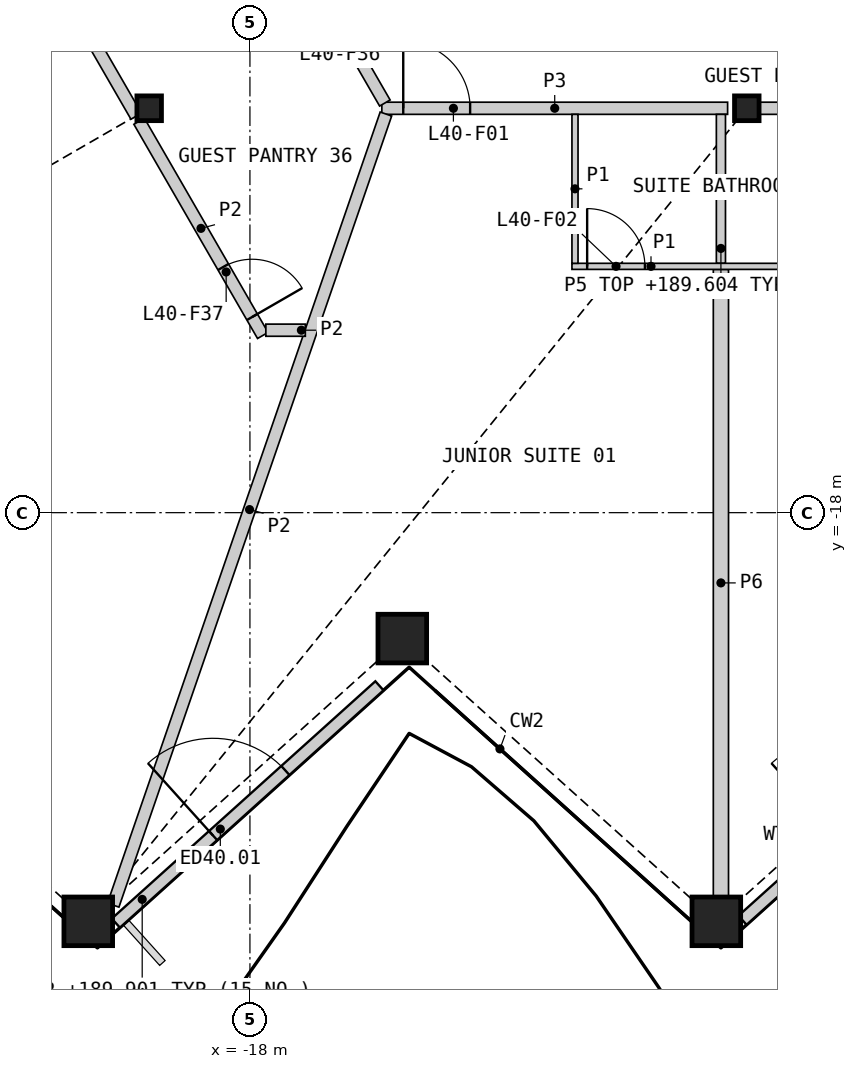
"""IFC4 building model, lengths in metres.
Left out: names, types, materials, properties, quantities, classifications, styles, units other than length and angle.
Written with IfcOpenShell. Run it as: python <this file> out.ifc"""

import sys

from ifc_helpers import new_model, si_unit, direction, frame, frame_2d, origin, origin_2d, place, context, subcontext, project, spatial, rectangle, hollow_rectangle, i_section, extrude, element, fill, save


model = new_model("IFC4")
c1 = context("Model", 3, precision=1e-05, world=origin(), true_north=direction((0.0, 1.0)))
c2 = subcontext(c1, "Body", "Model", "MODEL_VIEW")
j1 = project(units=[si_unit("LENGTHUNIT", "METRE"), si_unit("PLANEANGLEUNIT", "RADIAN")], contexts=[c1])
p1 = place(None, origin())
s1 = spatial("IfcSite", under=j1, at=p1, CompositionType="ELEMENT")
p2 = place(p1, origin())
s2 = spatial("IfcBuilding", under=s1, at=p2, CompositionType="ELEMENT")
p3 = place(p2, frame((0.0, 0.0, 187.2)))
s3 = spatial("IfcBuildingStorey", under=s2, at=p3, CompositionType="ELEMENT", Elevation=187.2)
for number, where, z_axis, x_axis in (
    (1, (-20.659, -24.722, 0.0), (0.0, 0.0, 1.0), (1.0, 0.0, 0.0)),
    (2, (-15.494, -20.071, 0.0), (0.0, 0.0, 1.0), (1.0, 0.0, 0.0)),
    (3, (-10.329, -24.722, 0.0), (0.0, 0.0, 1.0), (1.0, 0.0, 0.0)),
):
    element("IfcColumn", number, at=place(p3, frame(where, z_axis=z_axis, x_axis=x_axis)), inside=s3, PredefinedType="COLUMN", context=c2, shape_type="SweptSolid", body=[
        extrude(hollow_rectangle(XDim=0.8, YDim=0.8, WallThickness=0.05, at=origin_2d()), origin(), (0.0, 0.0, 1.0), 3.6),
    ])
for number, where, z_axis, x_axis in (
    (4, (-19.657, -11.349, 0.0), (0.0, 0.0, 1.0), (1.0, 0.0, 0.0)),
    (5, (-9.828, -11.349, 0.0), (0.0, 0.0, 1.0), (1.0, 0.0, 0.0)),
):
    element("IfcColumn", number, at=place(p3, frame(where, z_axis=z_axis, x_axis=x_axis)), inside=s3, PredefinedType="COLUMN", context=c2, shape_type="SweptSolid", body=[
        extrude(i_section(OverallWidth=0.404, OverallDepth=0.407, WebThickness=0.027, FlangeThickness=0.044, at=origin_2d()), origin(), (0.0, 0.0, 1.0), 3.6),
    ])
p4 = place(p3, frame((-20.205, -24.751, 0.0), z_axis=(0.0, 0.0, 1.0), x_axis=(0.743135964011, 0.669140447883, 0.0)))
e6 = element("IfcWall", 6, at=p4, inside=s3, PredefinedType="SOLIDWALL", context=c2, shape_type="SweptSolid", body=[
    extrude(rectangle(XDim=5.833, YDim=0.2, at=frame_2d((2.917, 0.0))), origin(), (0.0, 0.0, 1.0), 2.701),
])
p5 = place(p4, frame((2.152, 0.0, 0.0)))
e7 = element("IfcOpeningElement", 7, at=p5, cuts=e6, PredefinedType="OPENING", context=c2, shape_type="SweptSolid", body=[
    extrude(rectangle(XDim=1.6, YDim=2.4, at=frame_2d((0.8, 1.2))), frame((0.0, 0.11, 0.0), z_axis=(0.0, -1.0, 0.0), x_axis=(1.0, 0.0, 0.0)), (0.0, 0.0, 1.0), 0.22),
])
p6 = place(p3, frame((-9.899, -24.704, 0.0), z_axis=(0.0, 0.0, 1.0), x_axis=(0.74312139518, 0.669156627424, 0.0)))
e8 = element("IfcWall", 8, at=p6, inside=s3, PredefinedType="SOLIDWALL", context=c2, shape_type="SweptSolid", body=[
    extrude(rectangle(XDim=5.763, YDim=0.2, at=frame_2d((2.882, 0.0))), origin(), (0.0, 0.0, 1.0), 2.701),
])
p7 = place(p6, frame((2.082, 0.0, 0.0)))
e9 = element("IfcOpeningElement", 9, at=p7, cuts=e8, PredefinedType="OPENING", context=c2, shape_type="SweptSolid", body=[
    extrude(rectangle(XDim=1.6, YDim=2.4, at=frame_2d((0.8, 1.2))), frame((0.0, 0.11, 0.0), z_axis=(0.0, -1.0, 0.0), x_axis=(1.0, 0.0, 0.0)), (0.0, 0.0, 1.0), 0.22),
])
p8 = place(p3, frame((-10.254, -24.312, 0.0), z_axis=(0.0, 0.0, 1.0), x_axis=(0.0, 1.0, 0.0)))
e10 = element("IfcWall", 10, at=p8, inside=s3, PredefinedType="PARTITIONING", context=c2, shape_type="SweptSolid", body=[
    extrude(rectangle(XDim=10.313, YDim=0.25, at=frame_2d((5.156, 0.0))), origin(), (0.0, 0.0, 1.0), 2.404),
])
p9 = place(p3, frame((-9.615, -11.349, 0.0), z_axis=(0.0, 0.0, 1.0), x_axis=(1.0, 0.0, 0.0)))
e11 = element("IfcWall", 11, at=p9, inside=s3, PredefinedType="PARTITIONING", context=c2, shape_type="SweptSolid", body=[
    extrude(rectangle(XDim=9.401, YDim=0.2, at=frame_2d((4.701, 0.0))), origin(), (0.0, 0.0, 1.0), 3.25),
])
p10 = place(p9, frame((3.15, 0.0, 0.0)))
e12 = element("IfcOpeningElement", 12, at=p10, cuts=e11, PredefinedType="OPENING", context=c2, shape_type="SweptSolid", body=[
    extrude(rectangle(XDim=1.0, YDim=2.1, at=frame_2d((0.5, 1.05))), frame((0.0, 0.11, 0.0), z_axis=(0.0, -1.0, 0.0), x_axis=(1.0, 0.0, 0.0)), (0.0, 0.0, 1.0), 0.22),
])
p11 = place(p9, frame((4.851, 0.0, 0.0)))
e13 = element("IfcOpeningElement", 13, at=p11, cuts=e11, PredefinedType="OPENING", context=c2, shape_type="SweptSolid", body=[
    extrude(rectangle(XDim=1.0, YDim=2.1, at=frame_2d((0.5, 1.05))), frame((0.0, 0.11, 0.0), z_axis=(0.0, -1.0, 0.0), x_axis=(1.0, 0.0, 0.0)), (0.0, 0.0, 1.0), 0.22),
])
p12 = place(p3, frame((-15.831, -11.349, 0.0), z_axis=(0.0, 0.0, 1.0), x_axis=(1.0, 0.0, 0.0)))
e14 = element("IfcWall", 14, at=p12, inside=s3, PredefinedType="PARTITIONING", context=c2, shape_type="SweptSolid", body=[
    extrude(rectangle(XDim=5.687, YDim=0.2, at=frame_2d((2.843, 0.0))), origin(), (0.0, 0.0, 1.0), 3.25),
])
p13 = place(p12, frame((0.352, 0.0, 0.0)))
e15 = element("IfcOpeningElement", 15, at=p13, cuts=e14, PredefinedType="OPENING", context=c2, shape_type="SweptSolid", body=[
    extrude(rectangle(XDim=1.1, YDim=2.1, at=frame_2d((0.55, 1.05))), frame((0.0, 0.11, 0.0), z_axis=(0.0, -1.0, 0.0), x_axis=(1.0, 0.0, 0.0)), (0.0, 0.0, 1.0), 0.22),
])
p14 = place(p3, frame((-17.644, -8.035, 0.0), z_axis=(0.0, 0.0, 1.0), x_axis=(0.499958791762, -0.866049194065, 0.0)))
e16 = element("IfcWall", 16, at=p14, inside=s3, PredefinedType="PARTITIONING", context=c2, shape_type="SweptSolid", body=[
    extrude(rectangle(XDim=3.726, YDim=0.2, at=frame_2d((1.863, 0.0))), origin(), (0.0, 0.0, 1.0), 3.25),
])
p15 = place(p14, frame((1.388, 0.0, 0.0)))
e17 = element("IfcOpeningElement", 17, at=p15, cuts=e16, PredefinedType="OPENING", context=c2, shape_type="SweptSolid", body=[
    extrude(rectangle(XDim=0.95, YDim=2.1, at=frame_2d((0.475, 1.05))), frame((0.0, 0.11, 0.0), z_axis=(0.0, -1.0, 0.0), x_axis=(1.0, 0.0, 0.0)), (0.0, 0.0, 1.0), 0.22),
])
p16 = place(p3, frame((-20.249, -24.455, 0.0), z_axis=(0.0, 0.0, 1.0), x_axis=(0.325902118519, 0.945403516571, 0.0)))
e18 = element("IfcWall", 18, at=p16, inside=s3, PredefinedType="PARTITIONING", context=c2, shape_type="SweptSolid", body=[
    extrude(rectangle(XDim=13.763, YDim=0.2, at=frame_2d((6.881, 0.0))), origin(), (0.0, 0.0, 1.0), 2.404),
])
p17 = place(p3, frame((-21.958, -7.862, 0.0), z_axis=(0.0, 0.0, 1.0), x_axis=(0.499987304225, -0.866032733569, 0.0)))
e19 = element("IfcWall", 19, at=p17, inside=s3, PredefinedType="PARTITIONING", context=c2, shape_type="SweptSolid", body=[
    extrude(rectangle(XDim=4.176, YDim=0.2, at=frame_2d((2.088, 0.0))), origin(), (0.0, 0.0, 1.0), 2.404),
])
p18 = place(p3, frame((-19.822, -11.562, 0.0), z_axis=(0.0, 0.0, 1.0), x_axis=(0.499992600721, -0.866029675718, 0.0)))
e20 = element("IfcWall", 20, at=p18, inside=s3, PredefinedType="PARTITIONING", context=c2, shape_type="SweptSolid", body=[
    extrude(rectangle(XDim=4.068, YDim=0.2, at=frame_2d((2.034, 0.0))), origin(), (0.0, 0.0, 1.0), 2.404),
])
p19 = place(p18, frame((2.767, 0.0, 0.0)))
e21 = element("IfcOpeningElement", 21, at=p19, cuts=e20, PredefinedType="OPENING", context=c2, shape_type="SweptSolid", body=[
    extrude(rectangle(XDim=0.95, YDim=2.1, at=frame_2d((0.475, 1.05))), frame((0.0, 0.11, 0.0), z_axis=(0.0, -1.0, 0.0), x_axis=(1.0, 0.0, 0.0)), (0.0, 0.0, 1.0), 0.22),
])
p20 = place(p3, frame((-17.738, -14.999, 0.0), z_axis=(0.0, 0.0, 1.0), x_axis=(1.0, 0.0, 0.0)))
e22 = element("IfcWall", 22, at=p20, inside=s3, PredefinedType="PARTITIONING", context=c2, shape_type="SweptSolid", body=[
    extrude(rectangle(XDim=0.649, YDim=0.2, at=frame_2d((0.325, 0.0))), origin(), (0.0, 0.0, 1.0), 2.404),
])
p21 = place(p3, frame((-10.254, -13.899, 0.0), z_axis=(0.0, 0.0, 1.0), x_axis=(0.0, 1.0, 0.0)))
e23 = element("IfcWall", 23, at=p21, inside=s3, PredefinedType="PLUMBINGWALL", context=c2, shape_type="SweptSolid", body=[
    extrude(rectangle(XDim=2.45, YDim=0.15, at=frame_2d((1.225, 0.0))), origin(), (0.0, 0.0, 1.0), 2.404),
])
p22 = place(p3, frame((-12.704, -13.949, 0.0), z_axis=(0.0, 0.0, 1.0), x_axis=(1.0, 0.0, 0.0)))
e24 = element("IfcWall", 24, at=p22, inside=s3, PredefinedType="PARTITIONING", context=c2, shape_type="SweptSolid", body=[
    extrude(rectangle(XDim=5.2, YDim=0.1, at=frame_2d((2.6, 0.0))), origin(), (0.0, 0.0, 1.0), 2.404),
])
p23 = place(p22, frame((0.25, 0.0, 0.0)))
e25 = element("IfcOpeningElement", 25, at=p23, cuts=e24, PredefinedType="OPENING", context=c2, shape_type="SweptSolid", body=[
    extrude(rectangle(XDim=0.95, YDim=2.1, at=frame_2d((0.475, 1.05))), frame((0.0, 0.06, 0.0), z_axis=(0.0, -1.0, 0.0), x_axis=(1.0, 0.0, 0.0)), (0.0, 0.0, 1.0), 0.12),
])
p24 = place(p22, frame((4.0, 0.0, 0.0)))
e26 = element("IfcOpeningElement", 26, at=p24, cuts=e24, PredefinedType="OPENING", context=c2, shape_type="SweptSolid", body=[
    extrude(rectangle(XDim=0.95, YDim=2.1, at=frame_2d((0.475, 1.05))), frame((0.0, 0.06, 0.0), z_axis=(0.0, -1.0, 0.0), x_axis=(1.0, 0.0, 0.0)), (0.0, 0.0, 1.0), 0.12),
])
p25 = place(p3, frame((-12.654, -13.899, 0.0), z_axis=(0.0, 0.0, 1.0), x_axis=(0.0, 1.0, 0.0)))
e27 = element("IfcWall", 27, at=p25, inside=s3, PredefinedType="PARTITIONING", context=c2, shape_type="SweptSolid", body=[
    extrude(rectangle(XDim=2.45, YDim=0.1, at=frame_2d((1.225, 0.0))), origin(), (0.0, 0.0, 1.0), 2.404),
])
p26 = place(p5, origin())
e28 = element("IfcDoor", 28, at=p26, inside=s3, OperationType="DOUBLE_DOOR_SINGLE_SWING", PredefinedType="DOOR", context=c2, shape_type="SweptSolid", body=[
    extrude(rectangle(XDim=1.6, YDim=2.4, at=frame_2d((0.8, 1.2))), frame((0.0, 0.025, 0.0), z_axis=(0.0, -1.0, 0.0), x_axis=(1.0, 0.0, 0.0)), (0.0, 0.0, 1.0), 0.05),
])
fill(e7, e28)
p27 = place(p13, origin())
e29 = element("IfcDoor", 29, at=p27, inside=s3, OperationType="SINGLE_SWING_LEFT", PredefinedType="DOOR", context=c2, shape_type="SweptSolid", body=[
    extrude(rectangle(XDim=1.1, YDim=2.1, at=frame_2d((0.55, 1.05))), frame((0.0, 0.025, 0.0), z_axis=(0.0, -1.0, 0.0), x_axis=(1.0, 0.0, 0.0)), (0.0, 0.0, 1.0), 0.05),
])
fill(e15, e29)
p28 = place(p23, origin())
e30 = element("IfcDoor", 30, at=p28, inside=s3, OperationType="SINGLE_SWING_LEFT", PredefinedType="DOOR", context=c2, shape_type="SweptSolid", body=[
    extrude(rectangle(XDim=0.95, YDim=2.1, at=frame_2d((0.475, 1.05))), frame((0.0, 0.025, 0.0), z_axis=(0.0, -1.0, 0.0), x_axis=(1.0, 0.0, 0.0)), (0.0, 0.0, 1.0), 0.05),
])
fill(e25, e30)
p29 = place(p19, origin())
e31 = element("IfcDoor", 31, at=p29, inside=s3, OperationType="SINGLE_SWING_RIGHT", PredefinedType="DOOR", context=c2, shape_type="SweptSolid", body=[
    extrude(rectangle(XDim=0.95, YDim=2.1, at=frame_2d((0.475, 1.05))), frame((0.0, 0.025, 0.0), z_axis=(0.0, -1.0, 0.0), x_axis=(1.0, 0.0, 0.0)), (0.0, 0.0, 1.0), 0.05),
])
fill(e21, e31)
save(model, sys.argv[1])
